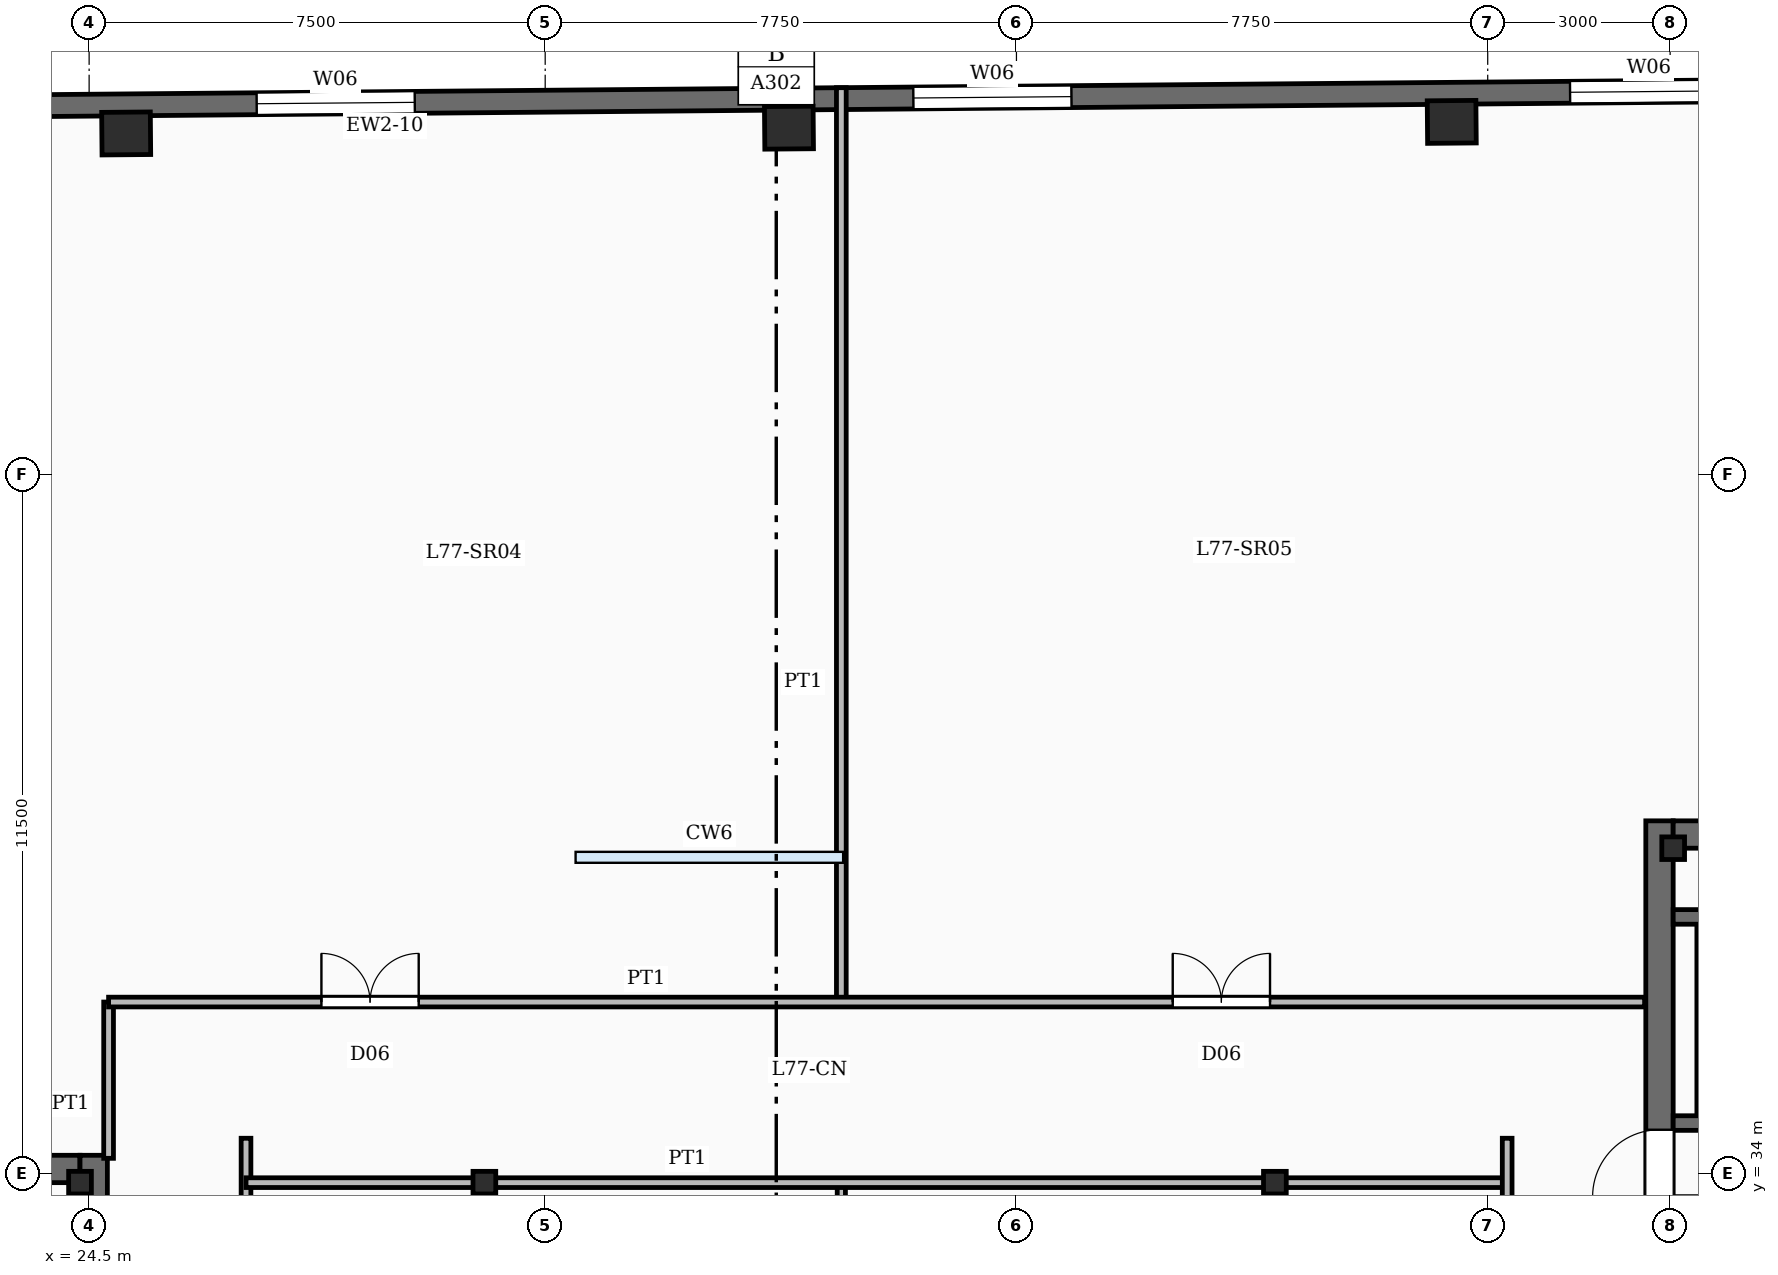
"""IFC4 building model, lengths in metres.
Left out: names, types, materials, properties, quantities, classifications, styles, units other than length and angle.
Written with IfcOpenShell. Run it as: python <this file> out.ifc"""

import sys

from ifc_helpers import new_model, si_unit, direction, frame, frame_2d, origin, origin_2d, place, context, subcontext, project, spatial, rectangle, i_section, extrude, element, fill, save


model = new_model("IFC4")
c1 = context("Model", 3, precision=1e-05, world=origin(), true_north=direction((0.0, 1.0)))
c2 = subcontext(c1, "Body", "Model", "MODEL_VIEW")
j1 = project(units=[si_unit("LENGTHUNIT", "METRE"), si_unit("PLANEANGLEUNIT", "RADIAN")], contexts=[c1])
p1 = place(None, origin())
s1 = spatial("IfcSite", under=j1, at=p1, CompositionType="ELEMENT")
p2 = place(p1, origin())
s2 = spatial("IfcBuilding", under=s1, at=p2, CompositionType="ELEMENT")
p3 = place(p2, frame((0.0, 0.0, 312.4)))
s3 = spatial("IfcBuildingStorey", under=s2, at=p3, CompositionType="ELEMENT", Elevation=312.4)
p4 = place(p3, frame((24.575, 19.0, -0.24), z_axis=(0.0, 0.0, 1.0), x_axis=(0.0, 1.0, 0.0)))
e1 = element("IfcWall", 1, at=p4, inside=s3, PredefinedType="SHEAR", context=c2, shape_type="SweptSolid", body=[
    extrude(rectangle(XDim=15.3, YDim=0.45, at=frame_2d((7.65, 0.0))), origin(), (0.0, 0.0, 1.0), 4.8),
])
p5 = place(p4, frame((2.5, 0.0, 0.24)))
e2 = element("IfcOpeningElement", 2, at=p5, cuts=e1, PredefinedType="OPENING", context=c2, shape_type="SweptSolid", body=[
    extrude(rectangle(XDim=1.05, YDim=2.15, at=frame_2d((0.525, 1.075))), frame((0.0, 0.235, 0.0), z_axis=(0.0, -1.0, 0.0), x_axis=(1.0, 0.0, 0.0)), (0.0, 0.0, 1.0), 0.47),
])
p6 = place(p4, frame((7.0, 0.0, 0.24)))
e3 = element("IfcOpeningElement", 3, at=p6, cuts=e1, PredefinedType="OPENING", context=c2, shape_type="SweptSolid", body=[
    extrude(rectangle(XDim=1.05, YDim=2.15, at=frame_2d((0.525, 1.075))), frame((0.0, 0.235, 0.0), z_axis=(0.0, -1.0, 0.0), x_axis=(1.0, 0.0, 0.0)), (0.0, 0.0, 1.0), 0.47),
])
p7 = place(p3, frame((14.55, 34.075, -0.24), z_axis=(0.0, 0.0, 1.0), x_axis=(1.0, 0.0, 0.0)))
e4 = element("IfcWall", 4, at=p7, inside=s3, PredefinedType="SHEAR", context=c2, shape_type="SweptSolid", body=[
    extrude(rectangle(XDim=9.8, YDim=0.45, at=frame_2d((4.9, 0.0))), origin(), (0.0, 0.0, 1.0), 4.8),
])
p8 = place(p3, frame((50.325, 19.0, -0.24), z_axis=(0.0, 0.0, 1.0), x_axis=(0.0, 1.0, 0.0)))
e5 = element("IfcWall", 5, at=p8, inside=s3, PredefinedType="SHEAR", context=c2, shape_type="SweptSolid", body=[
    extrude(rectangle(XDim=20.8, YDim=0.45, at=frame_2d((10.4, 0.0))), origin(), (0.0, 0.0, 1.0), 4.8),
])
p9 = place(p8, frame((2.5, 0.0, 0.24)))
e6 = element("IfcOpeningElement", 6, at=p9, cuts=e5, PredefinedType="OPENING", context=c2, shape_type="SweptSolid", body=[
    extrude(rectangle(XDim=1.05, YDim=2.15, at=frame_2d((0.525, 1.075))), frame((0.0, 0.235, 0.0), z_axis=(0.0, -1.0, 0.0), x_axis=(1.0, 0.0, 0.0)), (0.0, 0.0, 1.0), 0.47),
])
p10 = place(p8, frame((8.65, 0.0, 0.24)))
e7 = element("IfcOpeningElement", 7, at=p10, cuts=e5, PredefinedType="OPENING", context=c2, shape_type="SweptSolid", body=[
    extrude(rectangle(XDim=1.05, YDim=2.15, at=frame_2d((0.525, 1.075))), frame((0.0, 0.235, 0.0), z_axis=(0.0, -1.0, 0.0), x_axis=(1.0, 0.0, 0.0)), (0.0, 0.0, 1.0), 0.47),
])
p11 = place(p8, frame((14.62, 0.0, 0.24)))
e8 = element("IfcOpeningElement", 8, at=p11, cuts=e5, PredefinedType="OPENING", context=c2, shape_type="SweptSolid", body=[
    extrude(rectangle(XDim=1.1, YDim=2.15, at=frame_2d((0.55, 1.075))), frame((0.0, 0.235, 0.0), z_axis=(0.0, -1.0, 0.0), x_axis=(1.0, 0.0, 0.0)), (0.0, 0.0, 1.0), 0.47),
])
p12 = place(p3, frame((50.55, 39.575, -0.24), z_axis=(0.0, 0.0, 1.0), x_axis=(1.0, 0.0, 0.0)))
e9 = element("IfcWall", 9, at=p12, inside=s3, PredefinedType="SHEAR", context=c2, shape_type="SweptSolid", body=[
    extrude(rectangle(XDim=9.8, YDim=0.45, at=frame_2d((4.9, 0.0))), origin(), (0.0, 0.0, 1.0), 4.8),
])
for number, where, z_axis, x_axis in (
    (10, (24.35, 33.85, -0.24), (0.0, 0.0, 1.0), (1.0, 0.0, 0.0)),
    (11, (50.55, 39.35, -0.24), (0.0, 0.0, 1.0), (1.0, 0.0, 0.0)),
    (12, (31.0, 33.85, -0.24), (0.0, 0.0, 1.0), (1.0, 0.0, 0.0)),
    (13, (44.0, 33.85, -0.24), (0.0, 0.0, 1.0), (1.0, 0.0, 0.0)),
):
    element("IfcColumn", number, at=place(p3, frame(where, z_axis=z_axis, x_axis=x_axis)), inside=s3, PredefinedType="COLUMN", context=c2, shape_type="SweptSolid", body=[
        extrude(i_section(OverallWidth=0.374, OverallDepth=0.372, WebThickness=0.016, FlangeThickness=0.026, FilletRadius=0.02, at=origin_2d()), origin(), (0.0, 0.0, 1.0), 4.8),
    ])
for number, where, z_axis, x_axis in (
    (14, (46.908, 51.294, -0.24), (0.0, 0.0, 1.0), (1.0, 0.009, 0.0)),
    (15, (36.009, 51.199, -0.24), (0.0, 0.0, 1.0), (1.0, 0.009, 0.0)),
    (16, (25.109, 51.104, -0.24), (0.0, 0.0, 1.0), (1.0, 0.009, 0.0)),
):
    element("IfcColumn", number, at=place(p3, frame(where, z_axis=z_axis, x_axis=x_axis)), inside=s3, PredefinedType="COLUMN", context=c2, shape_type="SweptSolid", body=[
        extrude(rectangle(XDim=0.8, YDim=0.7, at=origin_2d()), origin(), (0.0, 0.0, 1.0), 4.8),
    ])
p13 = place(p3, frame((13.856, 51.476, 0.0), z_axis=(0.0, 0.0, 1.0), x_axis=(0.999961944954, 0.008724026757, 0.0)))
e17 = element("IfcWall", 17, at=p13, inside=s3, PredefinedType="SOLIDWALL", context=c2, shape_type="SweptSolid", body=[
    extrude(rectangle(XDim=44.3, YDim=0.36, at=frame_2d((22.15, 0.0))), origin(), (0.0, 0.0, 1.0), 4.56),
])
p14 = place(p13, frame((2.6, 0.0, 0.8)))
e18 = element("IfcOpeningElement", 18, at=p14, cuts=e17, PredefinedType="OPENING", context=c2, shape_type="SweptSolid", body=[
    extrude(rectangle(XDim=2.6, YDim=3.2, at=frame_2d((1.3, 1.6))), frame((0.0, 0.19, 0.0), z_axis=(0.0, -1.0, 0.0), x_axis=(1.0, 0.0, 0.0)), (0.0, 0.0, 1.0), 0.38),
])
p15 = place(p13, frame((13.4, 0.0, 0.8)))
e19 = element("IfcOpeningElement", 19, at=p15, cuts=e17, PredefinedType="OPENING", context=c2, shape_type="SweptSolid", body=[
    extrude(rectangle(XDim=2.6, YDim=3.2, at=frame_2d((1.3, 1.6))), frame((0.0, 0.19, 0.0), z_axis=(0.0, -1.0, 0.0), x_axis=(1.0, 0.0, 0.0)), (0.0, 0.0, 1.0), 0.38),
])
p16 = place(p13, frame((24.2, 0.0, 0.8)))
e20 = element("IfcOpeningElement", 20, at=p16, cuts=e17, PredefinedType="OPENING", context=c2, shape_type="SweptSolid", body=[
    extrude(rectangle(XDim=2.6, YDim=3.2, at=frame_2d((1.3, 1.6))), frame((0.0, 0.19, 0.0), z_axis=(0.0, -1.0, 0.0), x_axis=(1.0, 0.0, 0.0)), (0.0, 0.0, 1.0), 0.38),
])
p17 = place(p13, frame((35.0, 0.0, 0.8)))
e21 = element("IfcOpeningElement", 21, at=p17, cuts=e17, PredefinedType="OPENING", context=c2, shape_type="SweptSolid", body=[
    extrude(rectangle(XDim=2.6, YDim=3.2, at=frame_2d((1.3, 1.6))), frame((0.0, 0.19, 0.0), z_axis=(0.0, -1.0, 0.0), x_axis=(1.0, 0.0, 0.0)), (0.0, 0.0, 1.0), 0.38),
])
p18 = place(p3, frame((60.35, 34.83, 0.0), z_axis=(0.0, 0.0, 1.0), x_axis=(-1.0, 0.0, 0.0)))
e22 = element("IfcWall", 22, at=p18, inside=s3, PredefinedType="SOLIDWALL", context=c2, shape_type="SweptSolid", body=[
    extrude(rectangle(XDim=9.8, YDim=0.24, at=frame_2d((4.9, 0.0))), origin(), (0.0, 0.0, 1.0), 4.56),
])
p19 = place(p18, frame((7.87, 0.0, 0.0)))
e23 = element("IfcOpeningElement", 23, at=p19, cuts=e22, PredefinedType="OPENING", context=c2, shape_type="SweptSolid", body=[
    extrude(rectangle(XDim=1.1, YDim=2.15, at=frame_2d((0.55, 1.075))), frame((0.0, 0.13, 0.0), z_axis=(0.0, -1.0, 0.0), x_axis=(1.0, 0.0, 0.0)), (0.0, 0.0, 1.0), 0.26),
])
p20 = place(p3, frame((50.55, 38.22, 0.0), z_axis=(0.0, 0.0, 1.0), x_axis=(1.0, 0.0, 0.0)))
e24 = element("IfcWall", 24, at=p20, inside=s3, PredefinedType="SOLIDWALL", context=c2, shape_type="SweptSolid", body=[
    extrude(rectangle(XDim=9.8, YDim=0.24, at=frame_2d((4.9, 0.0))), origin(), (0.0, 0.0, 1.0), 4.56),
])
p21 = place(p3, frame((51.06, 34.95, 0.0), z_axis=(0.0, 0.0, 1.0), x_axis=(0.0, 1.0, 0.0)))
e25 = element("IfcWall", 25, at=p21, inside=s3, PredefinedType="SOLIDWALL", context=c2, shape_type="SweptSolid", body=[
    extrude(rectangle(XDim=3.15, YDim=0.24, at=frame_2d((1.575, 0.0))), origin(), (0.0, 0.0, 1.0), 4.56),
])
p22 = place(p3, frame((27.08, 33.85, 0.0), z_axis=(0.0, 0.0, 1.0), x_axis=(1.0, 0.0, 0.0)))
e26 = element("IfcWall", 26, at=p22, inside=s3, PredefinedType="PARTITIONING", context=c2, shape_type="SweptSolid", body=[
    extrude(rectangle(XDim=20.74, YDim=0.16, at=frame_2d((10.37, 0.0))), origin(), (0.0, 0.0, 1.0), 3.62),
])
p23 = place(p3, frame((36.87, 19.42, 0.0), z_axis=(0.0, 0.0, 1.0), x_axis=(0.0, 1.0, 0.0)))
e27 = element("IfcWall", 27, at=p23, inside=s3, PredefinedType="PARTITIONING", context=c2, shape_type="SweptSolid", body=[
    extrude(rectangle(XDim=14.43, YDim=0.135, at=frame_2d((7.215, 0.0))), origin(), (0.0, 0.0, 1.0), 3.62),
])
for number, where, z_axis, x_axis in (
    (28, (27.08, 15.38, 0.0), (0.0, 0.0, 1.0), (0.0, 1.0, 0.0)),
    (29, (47.82, 15.38, 0.0), (0.0, 0.0, 1.0), (0.0, 1.0, 0.0)),
):
    element("IfcWall", number, at=place(p3, frame(where, z_axis=z_axis, x_axis=x_axis)), inside=s3, PredefinedType="PARTITIONING", context=c2, shape_type="SweptSolid", body=[
        extrude(rectangle(XDim=19.2, YDim=0.16, at=frame_2d((9.6, 0.0))), origin(), (0.0, 0.0, 1.0), 3.62),
    ])
p24 = place(p3, frame((24.82, 34.25, 0.0), z_axis=(0.0, 0.0, 1.0), x_axis=(0.0, 1.0, 0.0)))
e30 = element("IfcWall", 30, at=p24, inside=s3, PredefinedType="PARTITIONING", context=c2, shape_type="SweptSolid", body=[
    extrude(rectangle(XDim=2.57, YDim=0.16, at=frame_2d((1.285, 0.0))), origin(), (0.0, 0.0, 1.0), 3.62),
])
p25 = place(p3, frame((24.82, 36.82, 0.0), z_axis=(0.0, 0.0, 1.0), x_axis=(1.0, 0.0, 0.0)))
e31 = element("IfcWall", 31, at=p25, inside=s3, PredefinedType="PARTITIONING", context=c2, shape_type="SweptSolid", body=[
    extrude(rectangle(XDim=25.26, YDim=0.16, at=frame_2d((12.63, 0.0))), origin(), (0.0, 0.0, 1.0), 3.62),
])
p26 = place(p25, frame((3.5, 0.0, 0.0)))
e32 = element("IfcOpeningElement", 32, at=p26, cuts=e31, PredefinedType="OPENING", context=c2, shape_type="SweptSolid", body=[
    extrude(rectangle(XDim=1.6, YDim=2.15, at=frame_2d((0.8, 1.075))), frame((0.0, 0.09, 0.0), z_axis=(0.0, -1.0, 0.0), x_axis=(1.0, 0.0, 0.0)), (0.0, 0.0, 1.0), 0.18),
])
p27 = place(p25, frame((17.5, 0.0, 0.0)))
e33 = element("IfcOpeningElement", 33, at=p27, cuts=e31, PredefinedType="OPENING", context=c2, shape_type="SweptSolid", body=[
    extrude(rectangle(XDim=1.6, YDim=2.15, at=frame_2d((0.8, 1.075))), frame((0.0, 0.09, 0.0), z_axis=(0.0, -1.0, 0.0), x_axis=(1.0, 0.0, 0.0)), (0.0, 0.0, 1.0), 0.18),
])
p28 = place(p3, frame((36.87, 36.82, 0.0), z_axis=(0.0, 0.0, 1.0), x_axis=(0.0, 1.0, 0.0)))
e34 = element("IfcWall", 34, at=p28, inside=s3, PredefinedType="PARTITIONING", context=c2, shape_type="SweptSolid", body=[
    extrude(rectangle(XDim=15.037, YDim=0.16, at=frame_2d((7.518, 0.0))), origin(), (0.0, 0.0, 1.0), 3.62),
])
p29 = place(p15, origin())
e35 = element("IfcWindow", 35, at=p29, inside=s3, PartitioningType="DOUBLE_PANEL_VERTICAL", PredefinedType="WINDOW", context=c2, shape_type="SweptSolid", body=[
    extrude(rectangle(XDim=2.6, YDim=3.2, at=frame_2d((1.3, 1.6))), frame((0.0, 0.03, 0.0), z_axis=(0.0, -1.0, 0.0), x_axis=(1.0, 0.0, 0.0)), (0.0, 0.0, 1.0), 0.06),
])
fill(e19, e35)
p30 = place(p16, origin())
e36 = element("IfcWindow", 36, at=p30, inside=s3, PartitioningType="DOUBLE_PANEL_VERTICAL", PredefinedType="WINDOW", context=c2, shape_type="SweptSolid", body=[
    extrude(rectangle(XDim=2.6, YDim=3.2, at=frame_2d((1.3, 1.6))), frame((0.0, 0.03, 0.0), z_axis=(0.0, -1.0, 0.0), x_axis=(1.0, 0.0, 0.0)), (0.0, 0.0, 1.0), 0.06),
])
fill(e20, e36)
p31 = place(p17, origin())
e37 = element("IfcWindow", 37, at=p31, inside=s3, PartitioningType="DOUBLE_PANEL_VERTICAL", PredefinedType="WINDOW", context=c2, shape_type="SweptSolid", body=[
    extrude(rectangle(XDim=2.6, YDim=3.2, at=frame_2d((1.3, 1.6))), frame((0.0, 0.03, 0.0), z_axis=(0.0, -1.0, 0.0), x_axis=(1.0, 0.0, 0.0)), (0.0, 0.0, 1.0), 0.06),
])
fill(e21, e37)
p32 = place(p11, origin())
e38 = element("IfcDoor", 38, at=p32, inside=s3, OperationType="SINGLE_SWING_LEFT", PredefinedType="DOOR", context=c2, shape_type="SweptSolid", body=[
    extrude(rectangle(XDim=1.1, YDim=2.15, at=frame_2d((0.55, 1.075))), frame((0.0, 0.025, 0.0), z_axis=(0.0, -1.0, 0.0), x_axis=(1.0, 0.0, 0.0)), (0.0, 0.0, 1.0), 0.05),
])
fill(e8, e38)
p33 = place(p26, origin())
e39 = element("IfcDoor", 39, at=p33, inside=s3, OperationType="DOUBLE_DOOR_SINGLE_SWING", PredefinedType="DOOR", context=c2, shape_type="SweptSolid", body=[
    extrude(rectangle(XDim=1.6, YDim=2.15, at=frame_2d((0.8, 1.075))), frame((0.0, 0.025, 0.0), z_axis=(0.0, -1.0, 0.0), x_axis=(1.0, 0.0, 0.0)), (0.0, 0.0, 1.0), 0.05),
])
fill(e32, e39)
p34 = place(p27, origin())
e40 = element("IfcDoor", 40, at=p34, inside=s3, OperationType="DOUBLE_DOOR_SINGLE_SWING", PredefinedType="DOOR", context=c2, shape_type="SweptSolid", body=[
    extrude(rectangle(XDim=1.6, YDim=2.15, at=frame_2d((0.8, 1.075))), frame((0.0, 0.025, 0.0), z_axis=(0.0, -1.0, 0.0), x_axis=(1.0, 0.0, 0.0)), (0.0, 0.0, 1.0), 0.05),
])
fill(e33, e40)
save(model, sys.argv[1])
